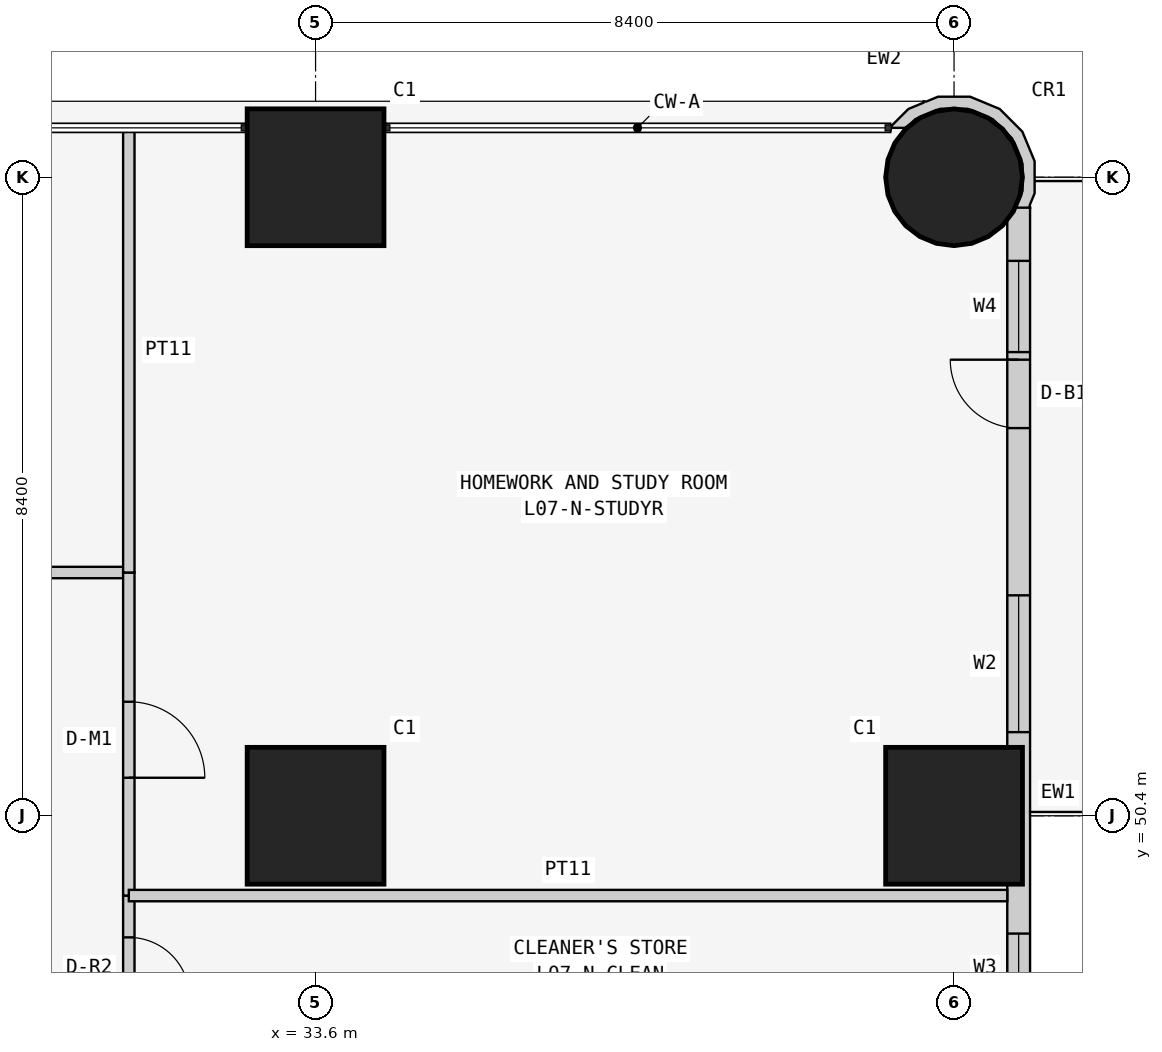
"""IFC4 building model, lengths in metres.
Left out: names, types, materials, properties, quantities, classifications, styles, units other than length and angle.
Written with IfcOpenShell. Run it as: python <this file> out.ifc"""

import sys

from ifc_helpers import new_model, si_unit, direction, frame, frame_2d, origin, origin_2d, place, context, subcontext, project, spatial, polyline, rectangle, circle, outline, extrude, element, fill, save


model = new_model("IFC4")
c1 = context("Model", 3, precision=1e-05, world=origin(), true_north=direction((0.0, 1.0)))
c2 = subcontext(c1, "Body", "Model", "MODEL_VIEW")
j1 = project(units=[si_unit("LENGTHUNIT", "METRE"), si_unit("PLANEANGLEUNIT", "RADIAN")], contexts=[c1])
p1 = place(None, origin())
s1 = spatial("IfcSite", under=j1, at=p1, CompositionType="ELEMENT")
p2 = place(p1, origin())
s2 = spatial("IfcBuilding", under=s1, at=p2, CompositionType="ELEMENT")
p3 = place(p2, frame((0.0, 0.0, 34.5)))
s3 = spatial("IfcBuildingStorey", under=s2, at=p3, CompositionType="ELEMENT", Elevation=34.5)
for number, where, z_axis, x_axis in (
    (1, (33.6, 50.4, 0.0), (0.0, 0.0, 1.0), (1.0, 0.0, 0.0)),
    (2, (33.6, 58.8, 0.0), (0.0, 0.0, 1.0), (1.0, 0.0, 0.0)),
    (3, (42.0, 50.4, 0.0), (0.0, 0.0, 1.0), (1.0, 0.0, 0.0)),
):
    element("IfcColumn", number, at=place(p3, frame(where, z_axis=z_axis, x_axis=x_axis)), inside=s3, PredefinedType="COLUMN", context=c2, shape_type="SweptSolid", body=[
        extrude(rectangle(XDim=1.8, YDim=1.8, at=origin_2d()), origin(), (0.0, 0.0, 1.0), 3.6),
    ])
p4 = place(p3, frame((42.0, 58.8, 0.0), z_axis=(0.0, 0.0, 1.0), x_axis=(1.0, 0.0, 0.0)))
e4 = element("IfcColumn", 4, at=p4, inside=s3, PredefinedType="COLUMN", context=c2, shape_type="SweptSolid", body=[
    extrude(circle(Radius=0.9, at=origin_2d()), origin(), (0.0, 0.0, 1.0), 3.6),
])
p5 = place(p3, frame((42.85, 43.0, 0.0), z_axis=(0.0, 0.0, 1.0), x_axis=(0.0, 1.0, 0.0)))
e5 = element("IfcWall", 5, at=p5, inside=s3, PredefinedType="SOLIDWALL", context=c2, shape_type="SweptSolid", body=[
    extrude(rectangle(XDim=15.4, YDim=0.3, at=frame_2d((7.7, 0.0))), origin(), (0.0, 0.0, 1.0), 3.45),
])
p6 = place(p5, frame((1.2, 0.0, 0.9)))
e6 = element("IfcOpeningElement", 6, at=p6, cuts=e5, PredefinedType="OPENING", context=c2, shape_type="SweptSolid", body=[
    extrude(rectangle(XDim=1.8, YDim=1.5, at=frame_2d((0.9, 0.75))), frame((0.0, 0.16, 0.0), z_axis=(0.0, -1.0, 0.0), x_axis=(1.0, 0.0, 0.0)), (0.0, 0.0, 1.0), 0.32),
])
p7 = place(p5, frame((4.95, 0.0, 1.5)))
e7 = element("IfcOpeningElement", 7, at=p7, cuts=e5, PredefinedType="OPENING", context=c2, shape_type="SweptSolid", body=[
    extrude(rectangle(XDim=0.9, YDim=0.7, at=frame_2d((0.45, 0.35))), frame((0.0, 0.16, 0.0), z_axis=(0.0, -1.0, 0.0), x_axis=(1.0, 0.0, 0.0)), (0.0, 0.0, 1.0), 0.32),
])
p8 = place(p5, frame((8.5, 0.0, 0.9)))
e8 = element("IfcOpeningElement", 8, at=p8, cuts=e5, PredefinedType="OPENING", context=c2, shape_type="SweptSolid", body=[
    extrude(rectangle(XDim=1.8, YDim=1.5, at=frame_2d((0.9, 0.75))), frame((0.0, 0.16, 0.0), z_axis=(0.0, -1.0, 0.0), x_axis=(1.0, 0.0, 0.0)), (0.0, 0.0, 1.0), 0.32),
])
p9 = place(p5, frame((12.5, 0.0, 0.0)))
e9 = element("IfcOpeningElement", 9, at=p9, cuts=e5, PredefinedType="OPENING", context=c2, shape_type="SweptSolid", body=[
    extrude(rectangle(XDim=0.9, YDim=2.4, at=frame_2d((0.45, 1.2))), frame((0.0, 0.16, 0.0), z_axis=(0.0, -1.0, 0.0), x_axis=(1.0, 0.0, 0.0)), (0.0, 0.0, 1.0), 0.32),
])
p10 = place(p5, frame((13.5, 0.0, 0.9)))
e10 = element("IfcOpeningElement", 10, at=p10, cuts=e5, PredefinedType="OPENING", context=c2, shape_type="SweptSolid", body=[
    extrude(rectangle(XDim=1.2, YDim=1.5, at=frame_2d((0.6, 0.75))), frame((0.0, 0.16, 0.0), z_axis=(0.0, -1.0, 0.0), x_axis=(1.0, 0.0, 0.0)), (0.0, 0.0, 1.0), 0.32),
])
p11 = place(p3, frame((42.91, 58.436, 0.0), z_axis=(0.0, 0.0, 1.0), x_axis=(0.377204953059, 0.926129809145, 0.0)))
e11 = element("IfcWall", 11, at=p11, inside=s3, PredefinedType="SOLIDWALL", context=c2, shape_type="SweptSolid", body=[
    extrude(outline(polyline([(0.769, 1.728), (0.75, 1.723), (0.6, 1.875), (0.295, 2.004), (0.281, 1.998), (0.36, 1.803), (0.509, 1.741), (0.761, 1.486), (0.896, 1.154), (0.894, 0.795), (0.755, 0.465), (0.5, 0.213), (0.168, 0.078), (-0.1, 0.08), (0.001, -0.097), (0.03, -0.08), (0.198, -0.081), (0.589, 0.078), (0.889, 0.374), (1.052, 0.763), (1.055, 1.185), (0.896, 1.575), (0.778, 1.695), (0.769, 1.728)])), origin(), (0.0, 0.0, 1.0), 3.45),
])
p12 = place(p3, frame((31.143, 53.6, 0.0), z_axis=(0.0, 0.0, 1.0), x_axis=(-1.0, 0.0, 0.0)))
e12 = element("IfcWall", 12, at=p12, inside=s3, PredefinedType="PARTITIONING", context=c2, shape_type="SweptSolid", body=[
    extrude(rectangle(XDim=3.486, YDim=0.15, at=frame_2d((1.743, 0.0))), origin(), (0.0, 0.0, 1.0), 3.45),
])
p13 = place(p3, frame((31.143, 47.6, 0.0), z_axis=(0.0, 0.0, 1.0), x_axis=(0.0, 1.0, 0.0)))
e13 = element("IfcWall", 13, at=p13, inside=s3, PredefinedType="PARTITIONING", context=c2, shape_type="SweptSolid", body=[
    extrude(rectangle(XDim=1.75, YDim=0.15, at=frame_2d((0.875, 0.0))), origin(), (0.0, 0.0, 1.0), 3.45),
])
p14 = place(p13, frame((0.4, 0.0, 0.0)))
e14 = element("IfcOpeningElement", 14, at=p14, cuts=e13, PredefinedType="OPENING", context=c2, shape_type="SweptSolid", body=[
    extrude(rectangle(XDim=0.8, YDim=2.1, at=frame_2d((0.4, 1.05))), frame((0.0, 0.085, 0.0), z_axis=(0.0, -1.0, 0.0), x_axis=(1.0, 0.0, 0.0)), (0.0, 0.0, 1.0), 0.17),
])
p15 = place(p3, frame((31.143, 49.35, 0.0), z_axis=(0.0, 0.0, 1.0), x_axis=(0.0, 1.0, 0.0)))
e15 = element("IfcWall", 15, at=p15, inside=s3, PredefinedType="PARTITIONING", context=c2, shape_type="SweptSolid", body=[
    extrude(rectangle(XDim=4.25, YDim=0.15, at=frame_2d((2.125, 0.0))), origin(), (0.0, 0.0, 1.0), 3.45),
])
p16 = place(p15, frame((1.55, 0.0, 0.0)))
e16 = element("IfcOpeningElement", 16, at=p16, cuts=e15, PredefinedType="OPENING", context=c2, shape_type="SweptSolid", body=[
    extrude(rectangle(XDim=1.0, YDim=2.1, at=frame_2d((0.5, 1.05))), frame((0.0, 0.085, 0.0), z_axis=(0.0, -1.0, 0.0), x_axis=(1.0, 0.0, 0.0)), (0.0, 0.0, 1.0), 0.17),
])
p17 = place(p3, frame((31.143, 59.45, 0.0), z_axis=(0.0, 0.0, 1.0), x_axis=(0.0, -1.0, 0.0)))
e17 = element("IfcWall", 17, at=p17, inside=s3, PredefinedType="PARTITIONING", context=c2, shape_type="SweptSolid", body=[
    extrude(rectangle(XDim=5.85, YDim=0.15, at=frame_2d((2.925, 0.0))), origin(), (0.0, 0.0, 1.0), 3.45),
])
p18 = place(p3, frame((42.7, 49.35, 0.0), z_axis=(0.0, 0.0, 1.0), x_axis=(-1.0, 0.0, 0.0)))
e18 = element("IfcWall", 18, at=p18, inside=s3, PredefinedType="PARTITIONING", context=c2, shape_type="SweptSolid", body=[
    extrude(rectangle(XDim=11.557, YDim=0.15, at=frame_2d((5.778, 0.0))), origin(), (0.0, 0.0, 1.0), 3.45),
])
p19 = place(p7, origin())
e19 = element("IfcWindow", 19, at=p19, inside=s3, PartitioningType="SINGLE_PANEL", PredefinedType="WINDOW", context=c2, shape_type="SweptSolid", body=[
    extrude(rectangle(XDim=0.9, YDim=0.7, at=frame_2d((0.45, 0.35))), frame((0.0, 0.03, 0.0), z_axis=(0.0, -1.0, 0.0), x_axis=(1.0, 0.0, 0.0)), (0.0, 0.0, 1.0), 0.06),
])
fill(e7, e19)
p20 = place(p8, origin())
e20 = element("IfcWindow", 20, at=p20, inside=s3, PartitioningType="SINGLE_PANEL", PredefinedType="WINDOW", context=c2, shape_type="SweptSolid", body=[
    extrude(rectangle(XDim=1.8, YDim=1.5, at=frame_2d((0.9, 0.75))), frame((0.0, 0.03, 0.0), z_axis=(0.0, -1.0, 0.0), x_axis=(1.0, 0.0, 0.0)), (0.0, 0.0, 1.0), 0.06),
])
fill(e8, e20)
p21 = place(p9, origin())
e21 = element("IfcDoor", 21, at=p21, inside=s3, OperationType="SINGLE_SWING_RIGHT", PredefinedType="DOOR", context=c2, shape_type="SweptSolid", body=[
    extrude(rectangle(XDim=0.9, YDim=2.4, at=frame_2d((0.45, 1.2))), frame((0.0, 0.025, 0.0), z_axis=(0.0, -1.0, 0.0), x_axis=(1.0, 0.0, 0.0)), (0.0, 0.0, 1.0), 0.05),
])
fill(e9, e21)
p22 = place(p10, origin())
e22 = element("IfcWindow", 22, at=p22, inside=s3, PartitioningType="SINGLE_PANEL", PredefinedType="WINDOW", context=c2, shape_type="SweptSolid", body=[
    extrude(rectangle(XDim=1.2, YDim=1.5, at=frame_2d((0.6, 0.75))), frame((0.0, 0.03, 0.0), z_axis=(0.0, -1.0, 0.0), x_axis=(1.0, 0.0, 0.0)), (0.0, 0.0, 1.0), 0.06),
])
fill(e10, e22)
p23 = place(p14, frame((0.8, 0.0, 0.0), z_axis=(0.0, 0.0, 1.0), x_axis=(-1.0, 0.0, 0.0)))
e23 = element("IfcDoor", 23, at=p23, inside=s3, OperationType="SINGLE_SWING_RIGHT", PredefinedType="DOOR", context=c2, shape_type="SweptSolid", body=[
    extrude(rectangle(XDim=0.8, YDim=2.1, at=frame_2d((0.4, 1.05))), frame((0.0, 0.025, 0.0), z_axis=(0.0, -1.0, 0.0), x_axis=(1.0, 0.0, 0.0)), (0.0, 0.0, 1.0), 0.05),
])
fill(e14, e23)
p24 = place(p16, frame((1.0, 0.0, 0.0), z_axis=(0.0, 0.0, 1.0), x_axis=(-1.0, 0.0, 0.0)))
e24 = element("IfcDoor", 24, at=p24, inside=s3, OperationType="SINGLE_SWING_RIGHT", PredefinedType="DOOR", context=c2, shape_type="SweptSolid", body=[
    extrude(rectangle(XDim=1.0, YDim=2.1, at=frame_2d((0.5, 1.05))), frame((0.0, 0.025, 0.0), z_axis=(0.0, -1.0, 0.0), x_axis=(1.0, 0.0, 0.0)), (0.0, 0.0, 1.0), 0.05),
])
fill(e16, e24)
save(model, sys.argv[1])
